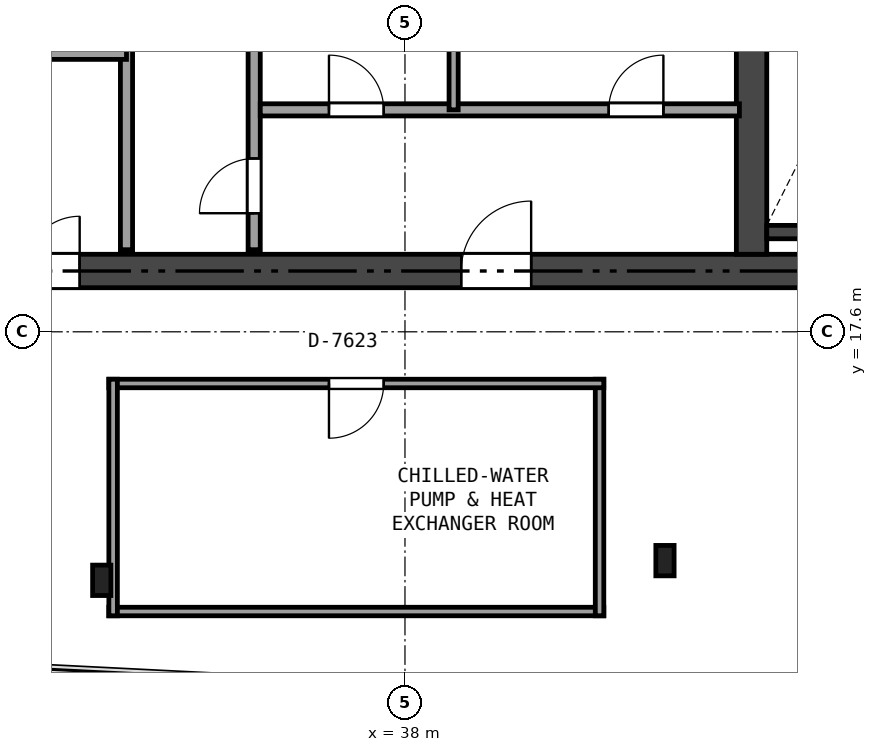
"""IFC4 building model, lengths in metres.
Left out: names, types, materials, properties, quantities, classifications, styles, units other than length and angle.
Written with IfcOpenShell. Run it as: python <this file> out.ifc"""

import sys

from ifc_helpers import new_model, si_unit, direction, frame, frame_2d, origin, origin_2d, place, context, subcontext, project, spatial, rectangle, i_section, extrude, element, fill, save


model = new_model("IFC4")
c1 = context("Model", 3, precision=1e-05, world=origin(), true_north=direction((0.0, 1.0)))
c2 = subcontext(c1, "Body", "Model", "MODEL_VIEW")
j1 = project(units=[si_unit("LENGTHUNIT", "METRE"), si_unit("PLANEANGLEUNIT", "RADIAN")], contexts=[c1])
p1 = place(None, origin())
s1 = spatial("IfcSite", under=j1, at=p1, CompositionType="ELEMENT")
p2 = place(p1, origin())
s2 = spatial("IfcBuilding", under=s1, at=p2, CompositionType="ELEMENT")
p3 = place(p2, frame((0.0, 0.0, 283.5)))
s3 = spatial("IfcBuildingStorey", under=s2, at=p3, CompositionType="ELEMENT", Elevation=283.5)
p4 = place(p3, frame((26.525, 18.6, 0.0), z_axis=(0.0, 0.0, 1.0), x_axis=(1.0, 0.0, 0.0)))
e1 = element("IfcWall", 1, at=p4, inside=s3, PredefinedType="SHEAR", context=c2, shape_type="SweptSolid", body=[
    extrude(rectangle(XDim=21.35, YDim=0.55, at=frame_2d((10.675, 0.0))), origin(), (0.0, 0.0, 1.0), 2.84),
])
p5 = place(p4, frame((12.4, 0.0, 0.0)))
e2 = element("IfcOpeningElement", 2, at=p5, cuts=e1, PredefinedType="OPENING", context=c2, shape_type="SweptSolid", body=[
    extrude(rectangle(XDim=1.15, YDim=2.15, at=frame_2d((0.575, 1.075))), frame((0.0, 0.285, 0.0), z_axis=(0.0, -1.0, 0.0), x_axis=(1.0, 0.0, 0.0)), (0.0, 0.0, 1.0), 0.57),
])
p6 = place(p4, frame((5.225, 0.0, 0.0)))
e3 = element("IfcOpeningElement", 3, at=p6, cuts=e1, PredefinedType="OPENING", context=c2, shape_type="SweptSolid", body=[
    extrude(rectangle(XDim=0.9, YDim=2.1, at=frame_2d((0.45, 1.05))), frame((0.0, 0.285, 0.0), z_axis=(0.0, -1.0, 0.0), x_axis=(1.0, 0.0, 0.0)), (0.0, 0.0, 1.0), 0.57),
])
p7 = place(p3, frame((43.7, 18.875, 0.0), z_axis=(0.0, 0.0, 1.0), x_axis=(0.0, 1.0, 0.0)))
e4 = element("IfcWall", 4, at=p7, inside=s3, PredefinedType="SHEAR", context=c2, shape_type="SweptSolid", body=[
    extrude(rectangle(XDim=15.05, YDim=0.5, at=frame_2d((7.525, 0.0))), origin(), (0.0, 0.0, 1.0), 2.84),
])
p8 = place(p7, frame((8.125, 0.0, 0.0)))
e5 = element("IfcOpeningElement", 5, at=p8, cuts=e4, PredefinedType="OPENING", context=c2, shape_type="SweptSolid", body=[
    extrude(rectangle(XDim=0.9, YDim=2.1, at=frame_2d((0.45, 1.05))), frame((0.0, 0.26, 0.0), z_axis=(0.0, -1.0, 0.0), x_axis=(1.0, 0.0, 0.0)), (0.0, 0.0, 1.0), 0.52),
])
p9 = place(p3, frame((43.95, 19.24, 0.0), z_axis=(0.0, 0.0, 1.0), x_axis=(1.0, 0.0, 0.0)))
e6 = element("IfcWall", 6, at=p9, inside=s3, PredefinedType="SHEAR", context=c2, shape_type="SweptSolid", body=[
    extrude(rectangle(XDim=3.375, YDim=0.22, at=frame_2d((1.688, 0.0))), origin(), (0.0, 0.0, 1.0), 2.84),
])
for number, where, z_axis, x_axis in (
    (7, (33.013, 13.513, 0.0), (0.0, 0.0, 1.0), (1.0, 0.0, 0.0)),
    (8, (42.276, 13.837, 0.0), (0.0, 0.0, 1.0), (1.0, 0.0, 0.0)),
):
    element("IfcColumn", number, at=place(p3, frame(where, z_axis=z_axis, x_axis=x_axis)), inside=s3, PredefinedType="COLUMN", context=c2, shape_type="SweptSolid", body=[
        extrude(i_section(OverallWidth=0.3, OverallDepth=0.5, WebThickness=0.015, FlangeThickness=0.028, at=origin_2d()), origin(), (0.0, 0.0, 1.0), 2.84),
    ])
p10 = place(p3, frame((35.52, 18.95, 0.0), z_axis=(0.0, 0.0, 1.0), x_axis=(0.0, 1.0, 0.0)))
e9 = element("IfcWall", 9, at=p10, inside=s3, PredefinedType="SOLIDWALL", context=c2, shape_type="SweptSolid", body=[
    extrude(rectangle(XDim=14.9, YDim=0.2, at=frame_2d((7.45, 0.0))), origin(), (0.0, 0.0, 1.0), 2.361),
])
p11 = place(p10, frame((7.755, 0.0, 0.0)))
e10 = element("IfcOpeningElement", 10, at=p11, cuts=e9, PredefinedType="OPENING", context=c2, shape_type="SweptSolid", body=[
    extrude(rectangle(XDim=0.95, YDim=2.15, at=frame_2d((0.475, 1.075))), frame((0.0, 0.11, 0.0), z_axis=(0.0, -1.0, 0.0), x_axis=(1.0, 0.0, 0.0)), (0.0, 0.0, 1.0), 0.22),
])
p12 = place(p10, frame((0.6, 0.0, 0.0)))
e11 = element("IfcOpeningElement", 11, at=p12, cuts=e9, PredefinedType="OPENING", context=c2, shape_type="SweptSolid", body=[
    extrude(rectangle(XDim=0.9, YDim=2.1, at=frame_2d((0.45, 1.05))), frame((0.0, 0.11, 0.0), z_axis=(0.0, -1.0, 0.0), x_axis=(1.0, 0.0, 0.0)), (0.0, 0.0, 1.0), 0.22),
])
p13 = place(p3, frame((33.42, 18.95, 0.0), z_axis=(0.0, 0.0, 1.0), x_axis=(0.0, 1.0, 0.0)))
e12 = element("IfcWall", 12, at=p13, inside=s3, PredefinedType="SOLIDWALL", context=c2, shape_type="SweptSolid", body=[
    extrude(rectangle(XDim=6.13, YDim=0.2, at=frame_2d((3.065, 0.0))), origin(), (0.0, 0.0, 1.0), 2.361),
])
p14 = place(p3, frame((31.0, 22.18, 0.0), z_axis=(0.0, 0.0, 1.0), x_axis=(1.0, 0.0, 0.0)))
e13 = element("IfcWall", 13, at=p14, inside=s3, PredefinedType="SOLIDWALL", context=c2, shape_type="SweptSolid", body=[
    extrude(rectangle(XDim=2.42, YDim=0.2, at=frame_2d((1.21, 0.0))), origin(), (0.0, 0.0, 1.0), 2.84),
])
p15 = place(p3, frame((35.62, 21.25, 0.0), z_axis=(0.0, 0.0, 1.0), x_axis=(1.0, 0.0, 0.0)))
e14 = element("IfcWall", 14, at=p15, inside=s3, PredefinedType="SOLIDWALL", context=c2, shape_type="SweptSolid", body=[
    extrude(rectangle(XDim=7.88, YDim=0.2, at=frame_2d((3.94, 0.0))), origin(), (0.0, 0.0, 1.0), 2.84),
])
p16 = place(p15, frame((1.13, 0.0, 0.0)))
e15 = element("IfcOpeningElement", 15, at=p16, cuts=e14, PredefinedType="OPENING", context=c2, shape_type="SweptSolid", body=[
    extrude(rectangle(XDim=0.9, YDim=2.1, at=frame_2d((0.45, 1.05))), frame((0.0, 0.11, 0.0), z_axis=(0.0, -1.0, 0.0), x_axis=(1.0, 0.0, 0.0)), (0.0, 0.0, 1.0), 0.22),
])
p17 = place(p15, frame((5.73, 0.0, 0.0)))
e16 = element("IfcOpeningElement", 16, at=p17, cuts=e14, PredefinedType="OPENING", context=c2, shape_type="SweptSolid", body=[
    extrude(rectangle(XDim=0.9, YDim=2.1, at=frame_2d((0.45, 1.05))), frame((0.0, 0.11, 0.0), z_axis=(0.0, -1.0, 0.0), x_axis=(1.0, 0.0, 0.0)), (0.0, 0.0, 1.0), 0.22),
])
p18 = place(p3, frame((38.8, 21.25, 0.0), z_axis=(0.0, 0.0, 1.0), x_axis=(0.0, 1.0, 0.0)))
e17 = element("IfcWall", 17, at=p18, inside=s3, PredefinedType="PARTITIONING", context=c2, shape_type="SweptSolid", body=[
    extrude(rectangle(XDim=2.4, YDim=0.15, at=frame_2d((1.2, 0.0))), origin(), (0.0, 0.0, 1.0), 2.361),
])
p19 = place(p3, frame((33.13, 13.0, 0.0), z_axis=(0.0, 0.0, 1.0), x_axis=(1.0, 0.0, 0.0)))
e18 = element("IfcWall", 18, at=p19, inside=s3, PredefinedType="PARTITIONING", context=c2, shape_type="SweptSolid", body=[
    extrude(rectangle(XDim=8.14, YDim=0.14, at=frame_2d((4.07, 0.0))), origin(), (0.0, 0.0, 1.0), 2.84),
])
p20 = place(p3, frame((41.2, 12.93, 0.0), z_axis=(0.0, 0.0, 1.0), x_axis=(0.0, 1.0, 0.0)))
e19 = element("IfcWall", 19, at=p20, inside=s3, PredefinedType="PARTITIONING", context=c2, shape_type="SweptSolid", body=[
    extrude(rectangle(XDim=3.89, YDim=0.14, at=frame_2d((1.945, 0.0))), origin(), (0.0, 0.0, 1.0), 2.285),
])
p21 = place(p3, frame((41.27, 16.75, 0.0), z_axis=(0.0, 0.0, 1.0), x_axis=(-1.0, 0.0, 0.0)))
e20 = element("IfcWall", 20, at=p21, inside=s3, PredefinedType="PARTITIONING", context=c2, shape_type="SweptSolid", body=[
    extrude(rectangle(XDim=8.14, YDim=0.14, at=frame_2d((4.07, 0.0))), origin(), (0.0, 0.0, 1.0), 2.285),
])
p22 = place(p21, frame((3.62, 0.0, 0.0)))
e21 = element("IfcOpeningElement", 21, at=p22, cuts=e20, PredefinedType="OPENING", context=c2, shape_type="SweptSolid", body=[
    extrude(rectangle(XDim=0.9, YDim=2.0, at=frame_2d((0.45, 1.0))), frame((0.0, 0.08, 0.0), z_axis=(0.0, -1.0, 0.0), x_axis=(1.0, 0.0, 0.0)), (0.0, 0.0, 1.0), 0.16),
])
p23 = place(p3, frame((33.2, 16.82, 0.0), z_axis=(0.0, 0.0, 1.0), x_axis=(0.0, -1.0, 0.0)))
e22 = element("IfcWall", 22, at=p23, inside=s3, PredefinedType="PARTITIONING", context=c2, shape_type="SweptSolid", body=[
    extrude(rectangle(XDim=3.89, YDim=0.14, at=frame_2d((1.945, 0.0))), origin(), (0.0, 0.0, 1.0), 2.285),
])
p24 = place(p5, origin())
e23 = element("IfcDoor", 23, at=p24, inside=s3, OperationType="SINGLE_SWING_RIGHT", PredefinedType="DOOR", context=c2, shape_type="SweptSolid", body=[
    extrude(rectangle(XDim=1.15, YDim=2.15, at=frame_2d((0.575, 1.075))), frame((0.0, 0.025, 0.0), z_axis=(0.0, -1.0, 0.0), x_axis=(1.0, 0.0, 0.0)), (0.0, 0.0, 1.0), 0.05),
])
fill(e2, e23)
p25 = place(p6, origin())
e24 = element("IfcDoor", 24, at=p25, inside=s3, OperationType="SINGLE_SWING_RIGHT", PredefinedType="DOOR", context=c2, shape_type="SweptSolid", body=[
    extrude(rectangle(XDim=0.9, YDim=2.1, at=frame_2d((0.45, 1.05))), frame((0.0, 0.025, 0.0), z_axis=(0.0, -1.0, 0.0), x_axis=(1.0, 0.0, 0.0)), (0.0, 0.0, 1.0), 0.05),
])
fill(e3, e24)
p26 = place(p12, origin())
e25 = element("IfcDoor", 25, at=p26, inside=s3, OperationType="SINGLE_SWING_LEFT", PredefinedType="DOOR", context=c2, shape_type="SweptSolid", body=[
    extrude(rectangle(XDim=0.9, YDim=2.1, at=frame_2d((0.45, 1.05))), frame((0.0, 0.025, 0.0), z_axis=(0.0, -1.0, 0.0), x_axis=(1.0, 0.0, 0.0)), (0.0, 0.0, 1.0), 0.05),
])
fill(e11, e25)
p27 = place(p16, origin())
e26 = element("IfcDoor", 26, at=p27, inside=s3, OperationType="SINGLE_SWING_LEFT", PredefinedType="DOOR", context=c2, shape_type="SweptSolid", body=[
    extrude(rectangle(XDim=0.9, YDim=2.1, at=frame_2d((0.45, 1.05))), frame((0.0, 0.025, 0.0), z_axis=(0.0, -1.0, 0.0), x_axis=(1.0, 0.0, 0.0)), (0.0, 0.0, 1.0), 0.05),
])
fill(e15, e26)
p28 = place(p17, origin())
e27 = element("IfcDoor", 27, at=p28, inside=s3, OperationType="SINGLE_SWING_RIGHT", PredefinedType="DOOR", context=c2, shape_type="SweptSolid", body=[
    extrude(rectangle(XDim=0.9, YDim=2.1, at=frame_2d((0.45, 1.05))), frame((0.0, 0.025, 0.0), z_axis=(0.0, -1.0, 0.0), x_axis=(1.0, 0.0, 0.0)), (0.0, 0.0, 1.0), 0.05),
])
fill(e16, e27)
p29 = place(p22, origin())
e28 = element("IfcDoor", 28, at=p29, inside=s3, OperationType="SINGLE_SWING_RIGHT", PredefinedType="DOOR", context=c2, shape_type="SweptSolid", body=[
    extrude(rectangle(XDim=0.9, YDim=2.0, at=frame_2d((0.45, 1.0))), frame((0.0, 0.025, 0.0), z_axis=(0.0, -1.0, 0.0), x_axis=(1.0, 0.0, 0.0)), (0.0, 0.0, 1.0), 0.05),
])
fill(e21, e28)
save(model, sys.argv[1])
